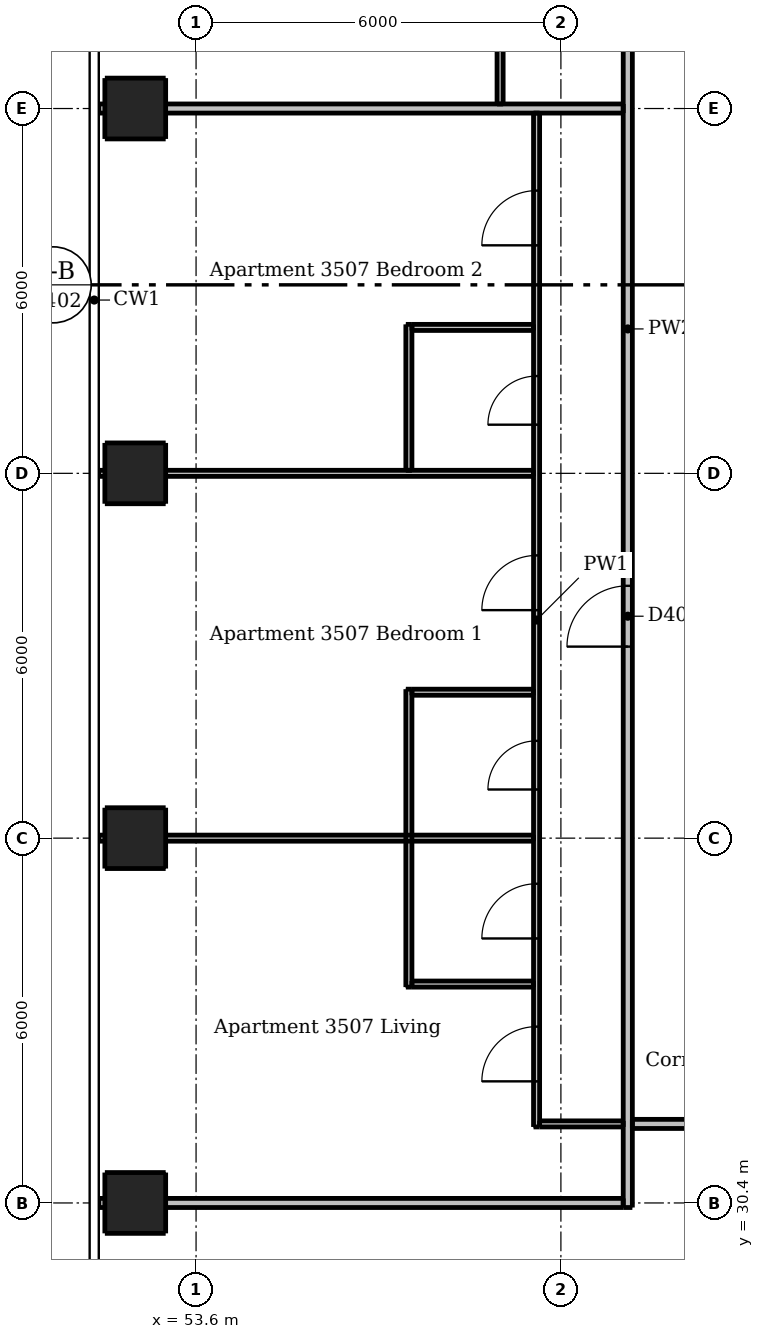
"""IFC4 building model, lengths in metres.
Left out: names, types, materials, properties, quantities, classifications, styles, units other than length and angle.
Written with IfcOpenShell. Run it as: python <this file> out.ifc"""

import sys

from ifc_helpers import new_model, si_unit, direction, frame, frame_2d, origin, origin_2d, place, context, subcontext, project, spatial, rectangle, extrude, element, fill, save


model = new_model("IFC4")
c1 = context("Model", 3, precision=1e-05, world=origin(), true_north=direction((0.0, 1.0)))
c2 = subcontext(c1, "Body", "Model", "MODEL_VIEW")
j1 = project(units=[si_unit("LENGTHUNIT", "METRE"), si_unit("PLANEANGLEUNIT", "RADIAN")], contexts=[c1])
p1 = place(None, origin())
s1 = spatial("IfcSite", under=j1, at=p1, CompositionType="ELEMENT")
p2 = place(p1, origin())
s2 = spatial("IfcBuilding", under=s1, at=p2, CompositionType="ELEMENT")
p3 = place(p2, frame((0.0, 0.0, 133.9)))
s3 = spatial("IfcBuildingStorey", under=s2, at=p3, CompositionType="ELEMENT", Elevation=133.9)
for number, where, z_axis, x_axis in (
    (1, (52.6, 30.4, 0.0), (0.0, 0.0, 1.0), (1.0, 0.0, 0.0)),
    (2, (52.6, 36.4, 0.0), (0.0, 0.0, 1.0), (1.0, 0.0, 0.0)),
    (3, (52.6, 42.4, 0.0), (0.0, 0.0, 1.0), (1.0, 0.0, 0.0)),
    (4, (52.6, 48.4, 0.0), (0.0, 0.0, 1.0), (1.0, 0.0, 0.0)),
):
    element("IfcColumn", number, at=place(p3, frame(where, z_axis=z_axis, x_axis=x_axis)), inside=s3, PredefinedType="COLUMN", context=c2, shape_type="SweptSolid", body=[
        extrude(rectangle(XDim=1.0, YDim=1.0, at=origin_2d()), origin(), (0.0, 0.0, 1.0), 3.05),
    ])
p4 = place(p3, frame((57.1, 33.95, 0.0), z_axis=(0.0, 0.0, 1.0), x_axis=(0.0, 1.0, 0.0)))
e5 = element("IfcWall", 5, at=p4, inside=s3, PredefinedType="PARTITIONING", context=c2, shape_type="SweptSolid", body=[
    extrude(rectangle(XDim=4.9, YDim=0.1, at=frame_2d((2.45, 0.0))), origin(), (0.0, 0.0, 1.0), 3.05),
])
p5 = place(p3, frame((57.1, 42.45, 0.0), z_axis=(0.0, 0.0, 1.0), x_axis=(0.0, 1.0, 0.0)))
e6 = element("IfcWall", 6, at=p5, inside=s3, PredefinedType="PARTITIONING", context=c2, shape_type="SweptSolid", body=[
    extrude(rectangle(XDim=2.4, YDim=0.1, at=frame_2d((1.2, 0.0))), origin(), (0.0, 0.0, 1.0), 3.05),
])
p6 = place(p3, frame((58.6, 54.35, 0.0), z_axis=(0.0, 0.0, 1.0), x_axis=(0.0, -1.0, 0.0)))
e7 = element("IfcWall", 7, at=p6, inside=s3, PredefinedType="PARTITIONING", context=c2, shape_type="SweptSolid", body=[
    extrude(rectangle(XDim=5.875, YDim=0.1, at=frame_2d((2.938, 0.0))), origin(), (0.0, 0.0, 1.0), 3.05),
])
p7 = place(p6, frame((3.75, 0.0, 0.0)))
e8 = element("IfcOpeningElement", 8, at=p7, cuts=e7, PredefinedType="OPENING", context=c2, shape_type="SweptSolid", body=[
    extrude(rectangle(XDim=0.8, YDim=2.1, at=frame_2d((0.4, 1.05))), frame((0.0, 0.06, 0.0), z_axis=(0.0, -1.0, 0.0), x_axis=(1.0, 0.0, 0.0)), (0.0, 0.0, 1.0), 0.12),
])
p8 = place(p3, frame((59.2, 31.65, 0.0), z_axis=(0.0, 0.0, 1.0), x_axis=(0.0, 1.0, 0.0)))
e9 = element("IfcWall", 9, at=p8, inside=s3, PredefinedType="PARTITIONING", context=c2, shape_type="SweptSolid", body=[
    extrude(rectangle(XDim=16.675, YDim=0.1, at=frame_2d((8.337, 0.0))), origin(), (0.0, 0.0, 1.0), 3.05),
])
p9 = place(p8, frame((0.75, 0.0, 0.0)))
e10 = element("IfcOpeningElement", 10, at=p9, cuts=e9, PredefinedType="OPENING", context=c2, shape_type="SweptSolid", body=[
    extrude(rectangle(XDim=0.9, YDim=2.1, at=frame_2d((0.45, 1.05))), frame((0.0, 0.06, 0.0), z_axis=(0.0, -1.0, 0.0), x_axis=(1.0, 0.0, 0.0)), (0.0, 0.0, 1.0), 0.12),
])
p10 = place(p8, frame((3.1, 0.0, 0.0)))
e11 = element("IfcOpeningElement", 11, at=p10, cuts=e9, PredefinedType="OPENING", context=c2, shape_type="SweptSolid", body=[
    extrude(rectangle(XDim=0.9, YDim=2.1, at=frame_2d((0.45, 1.05))), frame((0.0, 0.06, 0.0), z_axis=(0.0, -1.0, 0.0), x_axis=(1.0, 0.0, 0.0)), (0.0, 0.0, 1.0), 0.12),
])
p11 = place(p8, frame((8.5, 0.0, 0.0)))
e12 = element("IfcOpeningElement", 12, at=p11, cuts=e9, PredefinedType="OPENING", context=c2, shape_type="SweptSolid", body=[
    extrude(rectangle(XDim=0.9, YDim=2.1, at=frame_2d((0.45, 1.05))), frame((0.0, 0.06, 0.0), z_axis=(0.0, -1.0, 0.0), x_axis=(1.0, 0.0, 0.0)), (0.0, 0.0, 1.0), 0.12),
])
p12 = place(p8, frame((14.5, 0.0, 0.0)))
e13 = element("IfcOpeningElement", 13, at=p12, cuts=e9, PredefinedType="OPENING", context=c2, shape_type="SweptSolid", body=[
    extrude(rectangle(XDim=0.9, YDim=2.1, at=frame_2d((0.45, 1.05))), frame((0.0, 0.06, 0.0), z_axis=(0.0, -1.0, 0.0), x_axis=(1.0, 0.0, 0.0)), (0.0, 0.0, 1.0), 0.12),
])
p13 = place(p8, frame((5.55, 0.0, 0.0)))
e14 = element("IfcOpeningElement", 14, at=p13, cuts=e9, PredefinedType="OPENING", context=c2, shape_type="SweptSolid", body=[
    extrude(rectangle(XDim=0.8, YDim=2.1, at=frame_2d((0.4, 1.05))), frame((0.0, 0.06, 0.0), z_axis=(0.0, -1.0, 0.0), x_axis=(1.0, 0.0, 0.0)), (0.0, 0.0, 1.0), 0.12),
])
p14 = place(p8, frame((11.55, 0.0, 0.0)))
e15 = element("IfcOpeningElement", 15, at=p14, cuts=e9, PredefinedType="OPENING", context=c2, shape_type="SweptSolid", body=[
    extrude(rectangle(XDim=0.8, YDim=2.1, at=frame_2d((0.4, 1.05))), frame((0.0, 0.06, 0.0), z_axis=(0.0, -1.0, 0.0), x_axis=(1.0, 0.0, 0.0)), (0.0, 0.0, 1.0), 0.12),
])
p15 = place(p3, frame((57.15, 44.8, 0.0), z_axis=(0.0, 0.0, 1.0), x_axis=(1.0, 0.0, 0.0)))
e16 = element("IfcWall", 16, at=p15, inside=s3, PredefinedType="PARTITIONING", context=c2, shape_type="SweptSolid", body=[
    extrude(rectangle(XDim=2.0, YDim=0.1, at=frame_2d((1.0, 0.0))), origin(), (0.0, 0.0, 1.0), 3.05),
])
p16 = place(p3, frame((52.0, 42.4, 0.0), z_axis=(0.0, 0.0, 1.0), x_axis=(1.0, 0.0, 0.0)))
e17 = element("IfcWall", 17, at=p16, inside=s3, PredefinedType="PARTITIONING", context=c2, shape_type="SweptSolid", body=[
    extrude(rectangle(XDim=7.15, YDim=0.1, at=frame_2d((3.575, 0.0))), origin(), (0.0, 0.0, 1.0), 2.516),
])
p17 = place(p3, frame((57.15, 38.8, 0.0), z_axis=(0.0, 0.0, 1.0), x_axis=(1.0, 0.0, 0.0)))
e18 = element("IfcWall", 18, at=p17, inside=s3, PredefinedType="PARTITIONING", context=c2, shape_type="SweptSolid", body=[
    extrude(rectangle(XDim=2.0, YDim=0.1, at=frame_2d((1.0, 0.0))), origin(), (0.0, 0.0, 1.0), 3.05),
])
p18 = place(p3, frame((52.0, 36.4, 0.0), z_axis=(0.0, 0.0, 1.0), x_axis=(1.0, 0.0, 0.0)))
e19 = element("IfcWall", 19, at=p18, inside=s3, PredefinedType="PARTITIONING", context=c2, shape_type="SweptSolid", body=[
    extrude(rectangle(XDim=7.15, YDim=0.1, at=frame_2d((3.575, 0.0))), origin(), (0.0, 0.0, 1.0), 2.516),
])
p19 = place(p3, frame((57.15, 34.0, 0.0), z_axis=(0.0, 0.0, 1.0), x_axis=(1.0, 0.0, 0.0)))
e20 = element("IfcWall", 20, at=p19, inside=s3, PredefinedType="PARTITIONING", context=c2, shape_type="SweptSolid", body=[
    extrude(rectangle(XDim=2.0, YDim=0.1, at=frame_2d((1.0, 0.0))), origin(), (0.0, 0.0, 1.0), 3.05),
])
p20 = place(p3, frame((59.25, 31.7, 0.0), z_axis=(0.0, 0.0, 1.0), x_axis=(1.0, 0.0, 0.0)))
e21 = element("IfcWall", 21, at=p20, inside=s3, PredefinedType="PARTITIONING", context=c2, shape_type="SweptSolid", body=[
    extrude(rectangle(XDim=1.375, YDim=0.1, at=frame_2d((0.688, 0.0))), origin(), (0.0, 0.0, 1.0), 3.05),
])
p21 = place(p3, frame((60.7, 30.325, 0.0), z_axis=(0.0, 0.0, 1.0), x_axis=(0.0, 1.0, 0.0)))
e22 = element("IfcWall", 22, at=p21, inside=s3, PredefinedType="PARTITIONING", context=c2, shape_type="SweptSolid", body=[
    extrude(rectangle(XDim=28.9, YDim=0.15, at=frame_2d((14.45, 0.0))), origin(), (0.0, 0.0, 1.0), 3.05),
])
p22 = place(p21, frame((9.225, 0.0, 0.0)))
e23 = element("IfcOpeningElement", 23, at=p22, cuts=e22, PredefinedType="OPENING", context=c2, shape_type="SweptSolid", body=[
    extrude(rectangle(XDim=1.0, YDim=2.1, at=frame_2d((0.5, 1.05))), frame((0.0, 0.085, 0.0), z_axis=(0.0, -1.0, 0.0), x_axis=(1.0, 0.0, 0.0)), (0.0, 0.0, 1.0), 0.17),
])
p23 = place(p21, frame((26.025, 0.0, 0.0)))
e24 = element("IfcOpeningElement", 24, at=p23, cuts=e22, PredefinedType="OPENING", context=c2, shape_type="SweptSolid", body=[
    extrude(rectangle(XDim=1.0, YDim=2.1, at=frame_2d((0.5, 1.05))), frame((0.0, 0.085, 0.0), z_axis=(0.0, -1.0, 0.0), x_axis=(1.0, 0.0, 0.0)), (0.0, 0.0, 1.0), 0.17),
])
p24 = place(p3, frame((52.0, 48.4, 0.0), z_axis=(0.0, 0.0, 1.0), x_axis=(1.0, 0.0, 0.0)))
e25 = element("IfcWall", 25, at=p24, inside=s3, PredefinedType="PARTITIONING", context=c2, shape_type="SweptSolid", body=[
    extrude(rectangle(XDim=8.625, YDim=0.15, at=frame_2d((4.312, 0.0))), origin(), (0.0, 0.0, 1.0), 2.516),
])
p25 = place(p3, frame((89.525, 31.7, 0.0), z_axis=(0.0, 0.0, 1.0), x_axis=(-1.0, 0.0, 0.0)))
e26 = element("IfcWall", 26, at=p25, inside=s3, PredefinedType="PARTITIONING", context=c2, shape_type="SweptSolid", body=[
    extrude(rectangle(XDim=28.75, YDim=0.15, at=frame_2d((14.375, 0.0))), origin(), (0.0, 0.0, 1.0), 3.05),
])
p26 = place(p25, frame((25.875, 0.0, 0.0)))
e27 = element("IfcOpeningElement", 27, at=p26, cuts=e26, PredefinedType="OPENING", context=c2, shape_type="SweptSolid", body=[
    extrude(rectangle(XDim=1.0, YDim=2.1, at=frame_2d((0.5, 1.05))), frame((0.0, 0.085, 0.0), z_axis=(0.0, -1.0, 0.0), x_axis=(1.0, 0.0, 0.0)), (0.0, 0.0, 1.0), 0.17),
])
p27 = place(p25, frame((9.075, 0.0, 0.0)))
e28 = element("IfcOpeningElement", 28, at=p27, cuts=e26, PredefinedType="OPENING", context=c2, shape_type="SweptSolid", body=[
    extrude(rectangle(XDim=1.0, YDim=2.1, at=frame_2d((0.5, 1.05))), frame((0.0, 0.085, 0.0), z_axis=(0.0, -1.0, 0.0), x_axis=(1.0, 0.0, 0.0)), (0.0, 0.0, 1.0), 0.17),
])
p28 = place(p3, frame((52.0, 30.4, 0.0), z_axis=(0.0, 0.0, 1.0), x_axis=(1.0, 0.0, 0.0)))
e29 = element("IfcWall", 29, at=p28, inside=s3, PredefinedType="PARTITIONING", context=c2, shape_type="SweptSolid", body=[
    extrude(rectangle(XDim=8.625, YDim=0.15, at=frame_2d((4.312, 0.0))), origin(), (0.0, 0.0, 1.0), 2.647),
])
p29 = place(p22, origin())
e30 = element("IfcDoor", 30, at=p29, inside=s3, OperationType="SINGLE_SWING_LEFT", PredefinedType="DOOR", context=c2, shape_type="SweptSolid", body=[
    extrude(rectangle(XDim=1.0, YDim=2.1, at=frame_2d((0.5, 1.05))), frame((0.0, 0.025, 0.0), z_axis=(0.0, -1.0, 0.0), x_axis=(1.0, 0.0, 0.0)), (0.0, 0.0, 1.0), 0.05),
])
fill(e23, e30)
p30 = place(p9, origin())
e31 = element("IfcDoor", 31, at=p30, inside=s3, OperationType="SINGLE_SWING_LEFT", PredefinedType="DOOR", context=c2, shape_type="SweptSolid", body=[
    extrude(rectangle(XDim=0.9, YDim=2.1, at=frame_2d((0.45, 1.05))), frame((0.0, 0.025, 0.0), z_axis=(0.0, -1.0, 0.0), x_axis=(1.0, 0.0, 0.0)), (0.0, 0.0, 1.0), 0.05),
])
fill(e10, e31)
p31 = place(p10, origin())
e32 = element("IfcDoor", 32, at=p31, inside=s3, OperationType="SINGLE_SWING_LEFT", PredefinedType="DOOR", context=c2, shape_type="SweptSolid", body=[
    extrude(rectangle(XDim=0.9, YDim=2.1, at=frame_2d((0.45, 1.05))), frame((0.0, 0.025, 0.0), z_axis=(0.0, -1.0, 0.0), x_axis=(1.0, 0.0, 0.0)), (0.0, 0.0, 1.0), 0.05),
])
fill(e11, e32)
p32 = place(p11, origin())
e33 = element("IfcDoor", 33, at=p32, inside=s3, OperationType="SINGLE_SWING_LEFT", PredefinedType="DOOR", context=c2, shape_type="SweptSolid", body=[
    extrude(rectangle(XDim=0.9, YDim=2.1, at=frame_2d((0.45, 1.05))), frame((0.0, 0.025, 0.0), z_axis=(0.0, -1.0, 0.0), x_axis=(1.0, 0.0, 0.0)), (0.0, 0.0, 1.0), 0.05),
])
fill(e12, e33)
p33 = place(p12, origin())
e34 = element("IfcDoor", 34, at=p33, inside=s3, OperationType="SINGLE_SWING_LEFT", PredefinedType="DOOR", context=c2, shape_type="SweptSolid", body=[
    extrude(rectangle(XDim=0.9, YDim=2.1, at=frame_2d((0.45, 1.05))), frame((0.0, 0.025, 0.0), z_axis=(0.0, -1.0, 0.0), x_axis=(1.0, 0.0, 0.0)), (0.0, 0.0, 1.0), 0.05),
])
fill(e13, e34)
p34 = place(p13, origin())
e35 = element("IfcDoor", 35, at=p34, inside=s3, OperationType="SINGLE_SWING_LEFT", PredefinedType="DOOR", context=c2, shape_type="SweptSolid", body=[
    extrude(rectangle(XDim=0.8, YDim=2.1, at=frame_2d((0.4, 1.05))), frame((0.0, 0.025, 0.0), z_axis=(0.0, -1.0, 0.0), x_axis=(1.0, 0.0, 0.0)), (0.0, 0.0, 1.0), 0.05),
])
fill(e14, e35)
p35 = place(p14, origin())
e36 = element("IfcDoor", 36, at=p35, inside=s3, OperationType="SINGLE_SWING_LEFT", PredefinedType="DOOR", context=c2, shape_type="SweptSolid", body=[
    extrude(rectangle(XDim=0.8, YDim=2.1, at=frame_2d((0.4, 1.05))), frame((0.0, 0.025, 0.0), z_axis=(0.0, -1.0, 0.0), x_axis=(1.0, 0.0, 0.0)), (0.0, 0.0, 1.0), 0.05),
])
fill(e15, e36)
save(model, sys.argv[1])
